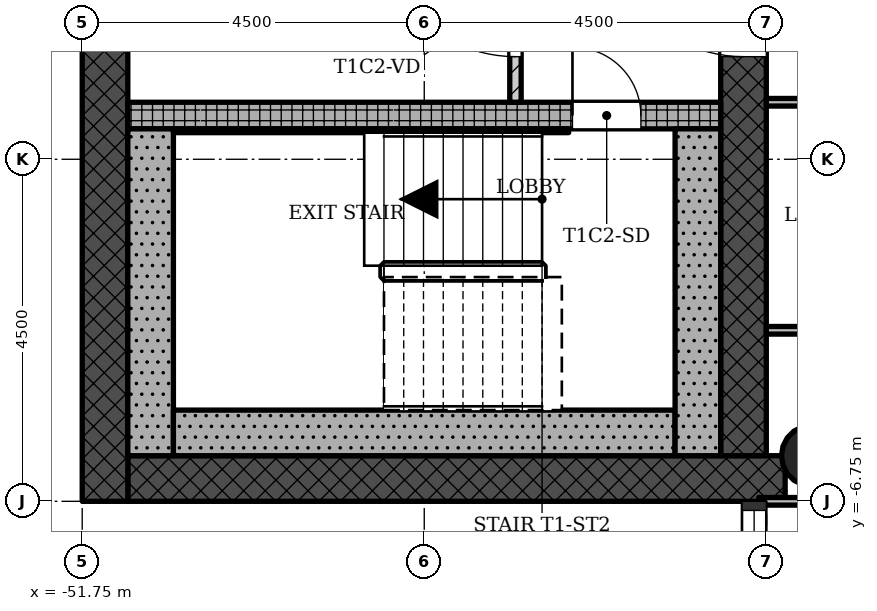
"""IFC4 building model, lengths in metres.
Left out: names, types, materials, properties, quantities, classifications, styles, units other than length and angle.
Written with IfcOpenShell. Run it as: python <this file> out.ifc"""

import sys

from ifc_helpers import new_model, si_unit, direction, frame, frame_2d, origin, origin_2d, place, context, subcontext, project, spatial, rectangle, hollow_circle, extrude, element, fill, save


model = new_model("IFC4")
c1 = context("Model", 3, precision=1e-05, world=origin(), true_north=direction((0.0, 1.0)))
c2 = subcontext(c1, "Body", "Model", "MODEL_VIEW")
j1 = project(units=[si_unit("LENGTHUNIT", "METRE"), si_unit("PLANEANGLEUNIT", "RADIAN")], contexts=[c1])
p1 = place(None, origin())
s1 = spatial("IfcSite", under=j1, at=p1, CompositionType="ELEMENT")
p2 = place(p1, origin())
s2 = spatial("IfcBuilding", under=s1, at=p2, CompositionType="ELEMENT")
p3 = place(p2, frame((0.0, 0.0, 185.8)))
s3 = spatial("IfcBuildingStorey", under=s2, at=p3, CompositionType="ELEMENT", Elevation=185.8)
p4 = place(p3, frame((-51.15, -6.45, 0.0), z_axis=(0.0, 0.0, 1.0), x_axis=(1.0, 0.0, 0.0)))
e1 = element("IfcWall", 1, at=p4, inside=s3, PredefinedType="SHEAR", context=c2, shape_type="SweptSolid", body=[
    extrude(rectangle(XDim=8.648, YDim=0.6, at=frame_2d((4.324, 0.0))), origin(), (0.0, 0.0, 1.0), 3.4),
])
p5 = place(p3, frame((-43.05, -6.15, 0.0), z_axis=(0.0, 0.0, 1.0), x_axis=(0.0, 1.0, 0.0)))
e2 = element("IfcWall", 2, at=p5, inside=s3, PredefinedType="SHEAR", context=c2, shape_type="SweptSolid", body=[
    extrude(rectangle(XDim=12.9, YDim=0.6, at=frame_2d((6.45, 0.0))), origin(), (0.0, 0.0, 1.0), 3.4),
])
p6 = place(p5, frame((5.25, 0.0, 0.0)))
e3 = element("IfcOpeningElement", 3, at=p6, cuts=e2, PredefinedType="OPENING", context=c2, shape_type="SweptSolid", body=[
    extrude(rectangle(XDim=1.8, YDim=2.1, at=frame_2d((0.9, 1.05))), frame((0.0, 0.31, 0.0), z_axis=(0.0, -1.0, 0.0), x_axis=(1.0, 0.0, 0.0)), (0.0, 0.0, 1.0), 0.62),
])
p7 = place(p3, frame((-51.45, 6.15, 0.0), z_axis=(0.0, 0.0, 1.0), x_axis=(0.0, -1.0, 0.0)))
e4 = element("IfcWall", 4, at=p7, inside=s3, PredefinedType="SHEAR", context=c2, shape_type="SweptSolid", body=[
    extrude(rectangle(XDim=12.9, YDim=0.6, at=frame_2d((6.45, 0.0))), origin(), (0.0, 0.0, 1.0), 3.4),
])
p8 = place(p7, frame((5.7, 0.0, 0.45)))
e5 = element("IfcOpeningElement", 5, at=p8, cuts=e4, PredefinedType="OPENING", context=c2, shape_type="SweptSolid", body=[
    extrude(rectangle(XDim=0.9, YDim=2.4, at=frame_2d((0.45, 1.2))), frame((0.0, 0.31, 0.0), z_axis=(0.0, -1.0, 0.0), x_axis=(1.0, 0.0, 0.0)), (0.0, 0.0, 1.0), 0.62),
])
p9 = place(p3, frame((-51.15, -1.675, 0.0), z_axis=(0.0, 0.0, 1.0), x_axis=(1.0, 0.0, 0.0)))
e6 = element("IfcWall", 6, at=p9, inside=s3, PredefinedType="SHEAR", context=c2, shape_type="SweptSolid", body=[
    extrude(rectangle(XDim=7.8, YDim=0.35, at=frame_2d((3.9, 0.0))), origin(), (0.0, 0.0, 1.0), 3.4),
])
p10 = place(p9, frame((5.85, 0.0, 0.0)))
e7 = element("IfcOpeningElement", 7, at=p10, cuts=e6, PredefinedType="OPENING", context=c2, shape_type="SweptSolid", body=[
    extrude(rectangle(XDim=0.9, YDim=2.1, at=frame_2d((0.45, 1.05))), frame((0.0, 0.185, 0.0), z_axis=(0.0, -1.0, 0.0), x_axis=(1.0, 0.0, 0.0)), (0.0, 0.0, 1.0), 0.37),
])
p11 = place(p3, frame((-42.15, -6.15, 0.0), z_axis=(0.0, 0.0, 1.0), x_axis=(1.0, 0.0, 0.0)))
e8 = element("IfcColumn", 8, at=p11, inside=s3, PredefinedType="COLUMN", context=c2, shape_type="SweptSolid", body=[
    extrude(hollow_circle(Radius=0.4, WallThickness=0.028, at=origin_2d()), origin(), (0.0, 0.0, 1.0), 3.4),
])
p12 = place(p3, frame((-46.05, 1.5, 0.0), z_axis=(0.0, 0.0, 1.0), x_axis=(0.0, -1.0, 0.0)))
e9 = element("IfcWall", 9, at=p12, inside=s3, PredefinedType="PARTITIONING", context=c2, shape_type="SweptSolid", body=[
    extrude(rectangle(XDim=3.0, YDim=0.15, at=frame_2d((1.5, 0.0))), origin(), (0.0, 0.0, 1.0), 3.0),
])
p13 = place(p12, frame((0.6, 0.0, 0.0)))
e10 = element("IfcOpeningElement", 10, at=p13, cuts=e9, PredefinedType="OPENING", context=c2, shape_type="SweptSolid", body=[
    extrude(rectangle(XDim=1.8, YDim=2.1, at=frame_2d((0.9, 1.05))), frame((0.0, 0.085, 0.0), z_axis=(0.0, -1.0, 0.0), x_axis=(1.0, 0.0, 0.0)), (0.0, 0.0, 1.0), 0.17),
])
p14 = place(p3, frame((-42.85, -6.75, 0.0), z_axis=(0.0, 0.0, 1.0), x_axis=(1.0, 0.0, 0.0)))
e11 = element("IfcWall", 11, at=p14, inside=s3, PredefinedType="PARTITIONING", context=c2, shape_type="SweptSolid", body=[
    extrude(rectangle(XDim=5.95, YDim=0.1, at=frame_2d((2.975, 0.0))), origin(), (0.0, 0.0, 1.0), 3.0),
])
p15 = place(p3, frame((-42.75, -4.5, 0.0), z_axis=(0.0, 0.0, 1.0), x_axis=(1.0, 0.0, 0.0)))
e12 = element("IfcWall", 12, at=p15, inside=s3, PredefinedType="PARTITIONING", context=c2, shape_type="SweptSolid", body=[
    extrude(rectangle(XDim=5.85, YDim=0.1, at=frame_2d((2.925, 0.0))), origin(), (0.0, 0.0, 1.0), 3.0),
])
p16 = place(p15, frame((3.6, 0.0, 0.0)))
e13 = element("IfcOpeningElement", 13, at=p16, cuts=e12, PredefinedType="OPENING", context=c2, shape_type="SweptSolid", body=[
    extrude(rectangle(XDim=0.9, YDim=2.1, at=frame_2d((0.45, 1.05))), frame((0.0, 0.06, 0.0), z_axis=(0.0, -1.0, 0.0), x_axis=(1.0, 0.0, 0.0)), (0.0, 0.0, 1.0), 0.12),
])
p17 = place(p3, frame((-42.75, -1.5, 0.0), z_axis=(0.0, 0.0, 1.0), x_axis=(1.0, 0.0, 0.0)))
e14 = element("IfcWall", 14, at=p17, inside=s3, PredefinedType="PARTITIONING", context=c2, shape_type="SweptSolid", body=[
    extrude(rectangle(XDim=2.25, YDim=0.1, at=frame_2d((1.125, 0.0))), origin(), (0.0, 0.0, 1.0), 3.0),
])
p18 = place(p3, frame((-50.85, -1.85, 0.0), z_axis=(0.0, 0.0, 1.0), x_axis=(0.0, -1.0, 0.0)))
e15 = element("IfcWall", 15, at=p18, inside=s3, PredefinedType="SHEAR", context=c2, shape_type="SweptSolid", body=[
    extrude(rectangle(XDim=4.3, YDim=0.6, at=frame_2d((2.15, 0.0))), origin(), (0.0, 0.0, 1.0), 3.4),
])
p19 = place(p3, frame((-43.95, -5.85, 0.0), z_axis=(0.0, 0.0, 1.0), x_axis=(-1.0, 0.0, 0.0)))
e16 = element("IfcWall", 16, at=p19, inside=s3, PredefinedType="SHEAR", context=c2, shape_type="SweptSolid", body=[
    extrude(rectangle(XDim=6.6, YDim=0.6, at=frame_2d((3.3, 0.0))), origin(), (0.0, 0.0, 1.0), 3.4),
])
p20 = place(p3, frame((-43.65, -1.85, 0.0), z_axis=(0.0, 0.0, 1.0), x_axis=(0.0, -1.0, 0.0)))
e17 = element("IfcWall", 17, at=p20, inside=s3, PredefinedType="SHEAR", context=c2, shape_type="SweptSolid", body=[
    extrude(rectangle(XDim=4.3, YDim=0.6, at=frame_2d((2.15, 0.0))), origin(), (0.0, 0.0, 1.0), 3.4),
])
p21 = place(p3, frame((-45.35, -1.875, 0.0), z_axis=(0.0, 0.0, 1.0), x_axis=(-1.0, 0.0, 0.0)))
e18 = element("IfcWall", 18, at=p21, inside=s3, PredefinedType="SHEAR", context=c2, shape_type="SweptSolid", body=[
    extrude(rectangle(XDim=5.2, YDim=0.05, at=frame_2d((2.6, 0.0))), origin(), (0.0, 0.0, 1.0), 3.4),
])
p22 = place(p13, origin())
e19 = element("IfcDoor", 19, at=p22, inside=s3, OperationType="SINGLE_SWING_LEFT", PredefinedType="DOOR", context=c2, shape_type="SweptSolid", body=[
    extrude(rectangle(XDim=1.8, YDim=2.1, at=frame_2d((0.9, 1.05))), frame((0.0, 0.025, 0.0), z_axis=(0.0, -1.0, 0.0), x_axis=(1.0, 0.0, 0.0)), (0.0, 0.0, 1.0), 0.05),
])
fill(e10, e19)
p23 = place(p10, origin())
e20 = element("IfcDoor", 20, at=p23, inside=s3, OperationType="SINGLE_SWING_RIGHT", PredefinedType="DOOR", context=c2, shape_type="SweptSolid", body=[
    extrude(rectangle(XDim=0.9, YDim=2.1, at=frame_2d((0.45, 1.05))), frame((0.0, 0.025, 0.0), z_axis=(0.0, -1.0, 0.0), x_axis=(1.0, 0.0, 0.0)), (0.0, 0.0, 1.0), 0.05),
])
fill(e7, e20)
p24 = place(p6, origin())
e21 = element("IfcDoor", 21, at=p24, inside=s3, OperationType="SINGLE_SWING_LEFT", PredefinedType="DOOR", context=c2, shape_type="SweptSolid", body=[
    extrude(rectangle(XDim=1.8, YDim=2.1, at=frame_2d((0.9, 1.05))), frame((0.0, 0.025, 0.0), z_axis=(0.0, -1.0, 0.0), x_axis=(1.0, 0.0, 0.0)), (0.0, 0.0, 1.0), 0.05),
])
fill(e3, e21)
save(model, sys.argv[1])
